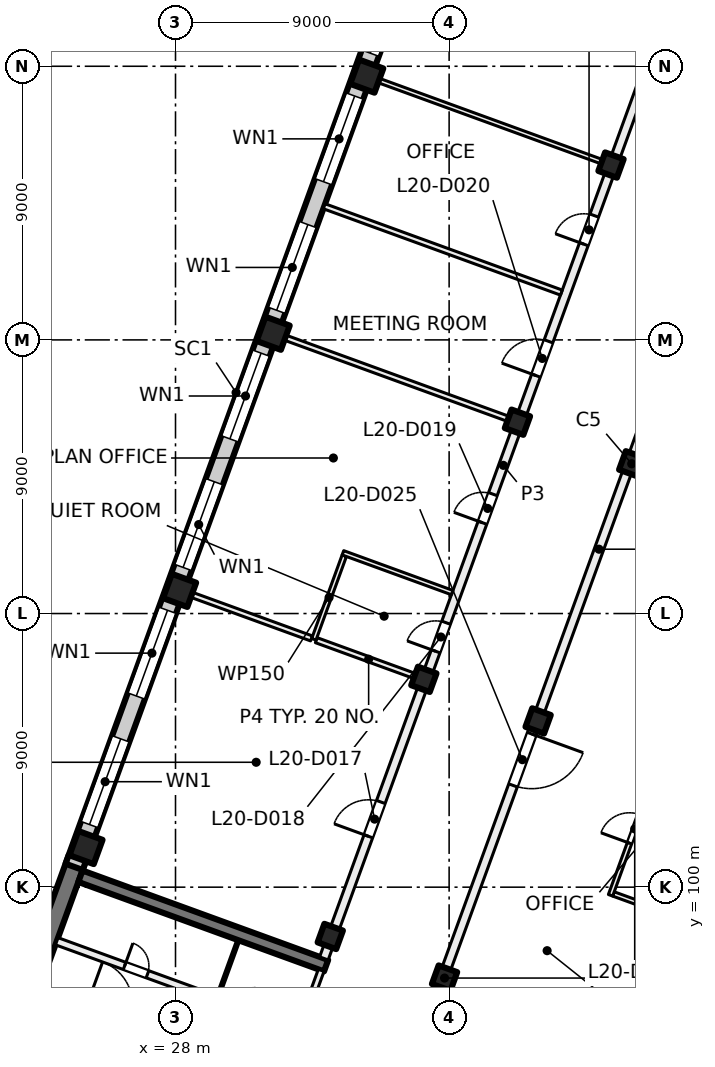
"""IFC4 building model, lengths in metres.
Left out: names, types, materials, properties, quantities, classifications, styles, units other than length and angle.
Written with IfcOpenShell. Run it as: python <this file> out.ifc"""

import sys

from ifc_helpers import new_model, si_unit, direction, frame, frame_2d, origin, origin_2d, place, context, subcontext, project, spatial, rectangle, extrude, element, fill, save


model = new_model("IFC4")
c1 = context("Model", 3, precision=1e-05, world=origin(), true_north=direction((0.0, 1.0)))
c2 = subcontext(c1, "Body", "Model", "MODEL_VIEW")
j1 = project(units=[si_unit("LENGTHUNIT", "METRE"), si_unit("PLANEANGLEUNIT", "RADIAN")], contexts=[c1])
p1 = place(None, origin())
s1 = spatial("IfcSite", under=j1, at=p1, CompositionType="ELEMENT")
p2 = place(p1, origin())
s2 = spatial("IfcBuilding", under=s1, at=p2, CompositionType="ELEMENT")
p3 = place(p2, frame((0.0, 0.0, 89.0)))
s3 = spatial("IfcBuildingStorey", under=s2, at=p3, CompositionType="ELEMENT", Elevation=89.0)
for number, where, z_axis, x_axis in (
    (1, (43.006, 113.925, 0.0), (0.0, 0.0, 1.0), (-0.342, -0.94, 0.0)),
    (2, (39.927, 105.468, 0.0), (0.0, 0.0, 1.0), (-0.342, -0.94, 0.0)),
    (3, (36.849, 97.011, 0.0), (0.0, 0.0, 1.0), (-0.342, -0.94, 0.0)),
    (4, (42.325, 123.751, 0.0), (0.0, 0.0, 1.0), (-0.342, -0.94, 0.0)),
    (5, (39.247, 115.293, 0.0), (0.0, 0.0, 1.0), (-0.342, -0.94, 0.0)),
    (6, (36.169, 106.836, 0.0), (0.0, 0.0, 1.0), (-0.342, -0.94, 0.0)),
    (7, (33.091, 98.379, 0.0), (0.0, 0.0, 1.0), (-0.342, -0.94, 0.0)),
):
    element("IfcColumn", number, at=place(p3, frame(where, z_axis=z_axis, x_axis=x_axis)), inside=s3, PredefinedType="COLUMN", context=c2, shape_type="SweptSolid", body=[
        extrude(rectangle(XDim=0.65, YDim=0.65, at=origin_2d()), origin(), (0.0, 0.0, 1.0), 4.0),
    ])
for number, where, z_axis, x_axis in (
    (8, (34.291, 126.675, 0.0), (0.0, 0.0, 1.0), (-0.342, -0.94, 0.0)),
    (9, (31.212, 118.218, 0.0), (0.0, 0.0, 1.0), (-0.342, -0.94, 0.0)),
    (10, (28.134, 109.76, 0.0), (0.0, 0.0, 1.0), (-0.342, -0.94, 0.0)),
    (11, (25.056, 101.303, 0.0), (0.0, 0.0, 1.0), (-0.342, -0.94, 0.0)),
):
    element("IfcColumn", number, at=place(p3, frame(where, z_axis=z_axis, x_axis=x_axis)), inside=s3, PredefinedType="COLUMN", context=c2, shape_type="SweptSolid", body=[
        extrude(rectangle(XDim=0.85, YDim=0.85, at=origin_2d()), origin(), (0.0, 0.0, 1.0), 4.0),
    ])
p4 = place(p3, frame((21.717, 92.568, 0.0), z_axis=(0.0, 0.0, 1.0), x_axis=(0.342017595281, 0.939693548195, 0.0)))
e12 = element("IfcWall", 12, at=p4, inside=s3, PredefinedType="SHEAR", context=c2, shape_type="SweptSolid", body=[
    extrude(rectangle(XDim=8.925, YDim=0.6, at=frame_2d((4.462, 0.0))), origin(), (0.0, 0.0, 1.0), 4.0),
])
p5 = place(p3, frame((32.953, 97.418, 0.0), z_axis=(0.0, 0.0, 1.0), x_axis=(-0.93969060187, 0.342025690201, 0.0)))
e13 = element("IfcWall", 13, at=p5, inside=s3, PredefinedType="SHEAR", context=c2, shape_type="SweptSolid", body=[
    extrude(rectangle(XDim=8.6, YDim=0.4, at=frame_2d((4.3, 0.0))), origin(), (0.0, 0.0, 1.0), 4.0),
])
p6 = place(p3, frame((24.666, 100.669, 0.0), z_axis=(0.0, 0.0, 1.0), x_axis=(0.34201964167, 0.939692803373, 0.0)))
e14 = element("IfcWall", 14, at=p6, inside=s3, PredefinedType="SOLIDWALL", context=c2, shape_type="SweptSolid", body=[
    extrude(rectangle(XDim=32.884, YDim=0.6, at=frame_2d((16.442, 0.0))), origin(), (0.0, 0.0, 1.0), 3.625),
])
p7 = place(p6, frame((1.48, 0.0, 0.9)))
e15 = element("IfcOpeningElement", 15, at=p7, cuts=e14, PredefinedType="OPENING", context=c2, shape_type="SweptSolid", body=[
    extrude(rectangle(XDim=3.0, YDim=2.4, at=frame_2d((1.5, 1.2))), frame((0.0, 0.31, 0.0), z_axis=(0.0, -1.0, 0.0), x_axis=(1.0, 0.0, 0.0)), (0.0, 0.0, 1.0), 0.62),
])
p8 = place(p6, frame((5.98, 0.0, 0.9)))
e16 = element("IfcOpeningElement", 16, at=p8, cuts=e14, PredefinedType="OPENING", context=c2, shape_type="SweptSolid", body=[
    extrude(rectangle(XDim=3.0, YDim=2.4, at=frame_2d((1.5, 1.2))), frame((0.0, 0.31, 0.0), z_axis=(0.0, -1.0, 0.0), x_axis=(1.0, 0.0, 0.0)), (0.0, 0.0, 1.0), 0.62),
])
p9 = place(p6, frame((10.48, 0.0, 0.9)))
e17 = element("IfcOpeningElement", 17, at=p9, cuts=e14, PredefinedType="OPENING", context=c2, shape_type="SweptSolid", body=[
    extrude(rectangle(XDim=3.0, YDim=2.4, at=frame_2d((1.5, 1.2))), frame((0.0, 0.31, 0.0), z_axis=(0.0, -1.0, 0.0), x_axis=(1.0, 0.0, 0.0)), (0.0, 0.0, 1.0), 0.62),
])
p10 = place(p6, frame((14.98, 0.0, 0.9)))
e18 = element("IfcOpeningElement", 18, at=p10, cuts=e14, PredefinedType="OPENING", context=c2, shape_type="SweptSolid", body=[
    extrude(rectangle(XDim=3.0, YDim=2.4, at=frame_2d((1.5, 1.2))), frame((0.0, 0.31, 0.0), z_axis=(0.0, -1.0, 0.0), x_axis=(1.0, 0.0, 0.0)), (0.0, 0.0, 1.0), 0.62),
])
p11 = place(p6, frame((19.48, 0.0, 0.9)))
e19 = element("IfcOpeningElement", 19, at=p11, cuts=e14, PredefinedType="OPENING", context=c2, shape_type="SweptSolid", body=[
    extrude(rectangle(XDim=3.0, YDim=2.4, at=frame_2d((1.5, 1.2))), frame((0.0, 0.31, 0.0), z_axis=(0.0, -1.0, 0.0), x_axis=(1.0, 0.0, 0.0)), (0.0, 0.0, 1.0), 0.62),
])
p12 = place(p6, frame((23.98, 0.0, 0.9)))
e20 = element("IfcOpeningElement", 20, at=p12, cuts=e14, PredefinedType="OPENING", context=c2, shape_type="SweptSolid", body=[
    extrude(rectangle(XDim=3.0, YDim=2.4, at=frame_2d((1.5, 1.2))), frame((0.0, 0.31, 0.0), z_axis=(0.0, -1.0, 0.0), x_axis=(1.0, 0.0, 0.0)), (0.0, 0.0, 1.0), 0.62),
])
p13 = place(p6, frame((28.48, 0.0, 0.9)))
e21 = element("IfcOpeningElement", 21, at=p13, cuts=e14, PredefinedType="OPENING", context=c2, shape_type="SweptSolid", body=[
    extrude(rectangle(XDim=3.0, YDim=2.4, at=frame_2d((1.5, 1.2))), frame((0.0, 0.31, 0.0), z_axis=(0.0, -1.0, 0.0), x_axis=(1.0, 0.0, 0.0)), (0.0, 0.0, 1.0), 0.62),
])
p14 = place(p3, frame((31.491, 93.693, 0.0), z_axis=(0.0, 0.0, 1.0), x_axis=(0.341995824804, 0.939701471648, 0.0)))
e22 = element("IfcWall", 22, at=p14, inside=s3, PredefinedType="PARTITIONING", context=c2, shape_type="SweptSolid", body=[
    extrude(rectangle(XDim=3.8, YDim=0.2, at=frame_2d((1.9, 0.0))), origin(), (0.0, 0.0, 1.0), 3.625),
])
p15 = place(p14, frame((0.3, 0.0, 0.0)))
e23 = element("IfcOpeningElement", 23, at=p15, cuts=e22, PredefinedType="OPENING", context=c2, shape_type="SweptSolid", body=[
    extrude(rectangle(XDim=1.2, YDim=2.1, at=frame_2d((0.6, 1.05))), frame((0.0, 0.11, 0.0), z_axis=(0.0, -1.0, 0.0), x_axis=(1.0, 0.0, 0.0)), (0.0, 0.0, 1.0), 0.22),
])
p16 = place(p3, frame((23.538, 96.694, 0.0), z_axis=(0.0, 0.0, 1.0), x_axis=(0.939691552312, -0.342023078919, 0.0)))
e24 = element("IfcWall", 24, at=p16, inside=s3, PredefinedType="PARTITIONING", context=c2, shape_type="SweptSolid", body=[
    extrude(rectangle(XDim=8.4, YDim=0.2, at=frame_2d((4.2, 0.0))), origin(), (0.0, 0.0, 1.0), 3.625),
])
p17 = place(p16, frame((1.65, 0.0, 0.0)))
e25 = element("IfcOpeningElement", 25, at=p17, cuts=e24, PredefinedType="OPENING", context=c2, shape_type="SweptSolid", body=[
    extrude(rectangle(XDim=1.5, YDim=2.1, at=frame_2d((0.75, 1.05))), frame((0.0, 0.11, 0.0), z_axis=(0.0, -1.0, 0.0), x_axis=(1.0, 0.0, 0.0)), (0.0, 0.0, 1.0), 0.22),
])
p18 = place(p3, frame((24.094, 98.221, 0.0), z_axis=(0.0, 0.0, 1.0), x_axis=(0.939691552312, -0.342023078919, 0.0)))
e26 = element("IfcWall", 26, at=p18, inside=s3, PredefinedType="PARTITIONING", context=c2, shape_type="SweptSolid", body=[
    extrude(rectangle(XDim=8.4, YDim=0.25, at=frame_2d((4.2, 0.0))), origin(), (0.0, 0.0, 1.0), 3.625),
])
p19 = place(p18, frame((6.625, 0.0, 0.0)))
e27 = element("IfcOpeningElement", 27, at=p19, cuts=e26, PredefinedType="OPENING", context=c2, shape_type="SweptSolid", body=[
    extrude(rectangle(XDim=0.8, YDim=2.1, at=frame_2d((0.4, 1.05))), frame((0.0, 0.135, 0.0), z_axis=(0.0, -1.0, 0.0), x_axis=(1.0, 0.0, 0.0)), (0.0, 0.0, 1.0), 0.27),
])
p20 = place(p18, frame((2.375, 0.0, 0.0)))
e28 = element("IfcOpeningElement", 28, at=p20, cuts=e26, PredefinedType="OPENING", context=c2, shape_type="SweptSolid", body=[
    extrude(rectangle(XDim=0.8, YDim=2.1, at=frame_2d((0.4, 1.05))), frame((0.0, 0.135, 0.0), z_axis=(0.0, -1.0, 0.0), x_axis=(1.0, 0.0, 0.0)), (0.0, 0.0, 1.0), 0.27),
])
p21 = place(p3, frame((29.399, 96.424, 0.0), z_axis=(0.0, 0.0, 1.0), x_axis=(0.341913947243, 0.939731266204, 0.0)))
e29 = element("IfcWall", 29, at=p21, inside=s3, PredefinedType="PARTITIONING", context=c2, shape_type="SweptSolid", body=[
    extrude(rectangle(XDim=1.95, YDim=0.1, at=frame_2d((0.975, 0.0))), origin(), (0.0, 0.0, 1.0), 3.625),
])
p22 = place(p3, frame((28.275, 109.709, 0.0), z_axis=(0.0, 0.0, 1.0), x_axis=(0.939727969122, -0.34192300895, 0.0)))
e30 = element("IfcWall", 30, at=p22, inside=s3, PredefinedType="PARTITIONING", context=c2, shape_type="SweptSolid", body=[
    extrude(rectangle(XDim=4.466, YDim=0.175, at=frame_2d((2.233, 0.0))), origin(), (0.0, 0.0, 1.0), 3.625),
])
p23 = place(p3, frame((31.353, 118.166, 0.0), z_axis=(0.0, 0.0, 1.0), x_axis=(0.939687752599, -0.342033518263, 0.0)))
e31 = element("IfcWall", 31, at=p23, inside=s3, PredefinedType="PARTITIONING", context=c2, shape_type="SweptSolid", body=[
    extrude(rectangle(XDim=8.301, YDim=0.175, at=frame_2d((4.15, 0.0))), origin(), (0.0, 0.0, 1.0), 3.625),
])
p24 = place(p3, frame((32.63, 108.124, 0.0), z_axis=(0.0, 0.0, 1.0), x_axis=(0.939692277825, -0.342021085601, 0.0)))
e32 = element("IfcWall", 32, at=p24, inside=s3, PredefinedType="PARTITIONING", context=c2, shape_type="SweptSolid", body=[
    extrude(rectangle(XDim=3.666, YDim=0.175, at=frame_2d((1.833, 0.0))), origin(), (0.0, 0.0, 1.0), 3.625),
])
p25 = place(p3, frame((32.551, 108.153, 0.0), z_axis=(0.0, 0.0, 1.0), x_axis=(0.341850278959, 0.939754428974, 0.0)))
e33 = element("IfcWall", 33, at=p25, inside=s3, PredefinedType="PARTITIONING", context=c2, shape_type="SweptSolid", body=[
    extrude(rectangle(XDim=2.925, YDim=0.15, at=frame_2d((1.463, 0.0))), origin(), (0.0, 0.0, 1.0), 3.625),
])
p26 = place(p3, frame((32.881, 97.657, 0.0), z_axis=(0.0, 0.0, 1.0), x_axis=(0.342017360004, 0.939693633828, 0.0)))
e34 = element("IfcWall", 34, at=p26, inside=s3, PredefinedType="PARTITIONING", context=c2, shape_type="SweptSolid", body=[
    extrude(rectangle(XDim=34.516, YDim=0.3, at=frame_2d((17.258, 0.0))), origin(), (0.0, 0.0, 1.0), 3.625),
])
p27 = place(p26, frame((4.275, 0.0, 0.0)))
e35 = element("IfcOpeningElement", 35, at=p27, cuts=e34, PredefinedType="OPENING", context=c2, shape_type="SweptSolid", body=[
    extrude(rectangle(XDim=1.2, YDim=2.1, at=frame_2d((0.6, 1.05))), frame((0.0, 0.16, 0.0), z_axis=(0.0, -1.0, 0.0), x_axis=(1.0, 0.0, 0.0)), (0.0, 0.0, 1.0), 0.32),
])
p28 = place(p26, frame((10.75, 0.0, 0.0)))
e36 = element("IfcOpeningElement", 36, at=p28, cuts=e34, PredefinedType="OPENING", context=c2, shape_type="SweptSolid", body=[
    extrude(rectangle(XDim=1.0, YDim=2.1, at=frame_2d((0.5, 1.05))), frame((0.0, 0.16, 0.0), z_axis=(0.0, -1.0, 0.0), x_axis=(1.0, 0.0, 0.0)), (0.0, 0.0, 1.0), 0.32),
])
p29 = place(p26, frame((15.25, 0.0, 0.0)))
e37 = element("IfcOpeningElement", 37, at=p29, cuts=e34, PredefinedType="OPENING", context=c2, shape_type="SweptSolid", body=[
    extrude(rectangle(XDim=1.0, YDim=2.1, at=frame_2d((0.5, 1.05))), frame((0.0, 0.16, 0.0), z_axis=(0.0, -1.0, 0.0), x_axis=(1.0, 0.0, 0.0)), (0.0, 0.0, 1.0), 0.32),
])
p30 = place(p26, frame((20.4, 0.0, 0.0)))
e38 = element("IfcOpeningElement", 38, at=p30, cuts=e34, PredefinedType="OPENING", context=c2, shape_type="SweptSolid", body=[
    extrude(rectangle(XDim=1.2, YDim=2.1, at=frame_2d((0.6, 1.05))), frame((0.0, 0.16, 0.0), z_axis=(0.0, -1.0, 0.0), x_axis=(1.0, 0.0, 0.0)), (0.0, 0.0, 1.0), 0.32),
])
p31 = place(p26, frame((25.0, 0.0, 0.0)))
e39 = element("IfcOpeningElement", 39, at=p31, cuts=e34, PredefinedType="OPENING", context=c2, shape_type="SweptSolid", body=[
    extrude(rectangle(XDim=1.0, YDim=2.1, at=frame_2d((0.5, 1.05))), frame((0.0, 0.16, 0.0), z_axis=(0.0, -1.0, 0.0), x_axis=(1.0, 0.0, 0.0)), (0.0, 0.0, 1.0), 0.32),
])
p32 = place(p3, frame((32.892, 122.395, 0.0), z_axis=(0.0, 0.0, 1.0), x_axis=(0.939684311623, -0.3420429717, 0.0)))
e40 = element("IfcWall", 40, at=p32, inside=s3, PredefinedType="PARTITIONING", context=c2, shape_type="SweptSolid", body=[
    extrude(rectangle(XDim=8.301, YDim=0.175, at=frame_2d((4.15, 0.0))), origin(), (0.0, 0.0, 1.0), 3.625),
])
p33 = place(p3, frame((33.507, 110.998, 0.0), z_axis=(0.0, 0.0, 1.0), x_axis=(0.939610657605, -0.342245251415, 0.0)))
e41 = element("IfcWall", 41, at=p33, inside=s3, PredefinedType="PARTITIONING", context=c2, shape_type="SweptSolid", body=[
    extrude(rectangle(XDim=3.825, YDim=0.15, at=frame_2d((1.913, 0.0))), origin(), (0.0, 0.0, 1.0), 3.625),
])
p34 = place(p3, frame((46.282, 98.367, 0.0), z_axis=(0.0, 0.0, 1.0), x_axis=(-0.939765774653, 0.341819087808, 0.0)))
e42 = element("IfcWall", 42, at=p34, inside=s3, PredefinedType="PARTITIONING", context=c2, shape_type="SweptSolid", body=[
    extrude(rectangle(XDim=4.125, YDim=0.15, at=frame_2d((2.063, 0.0))), origin(), (0.0, 0.0, 1.0), 3.625),
])
p35 = place(p3, frame((42.309, 99.733, 0.0), z_axis=(0.0, 0.0, 1.0), x_axis=(0.342023551531, 0.939691380293, 0.0)))
e43 = element("IfcWall", 43, at=p35, inside=s3, PredefinedType="PARTITIONING", context=c2, shape_type="SweptSolid", body=[
    extrude(rectangle(XDim=13.488, YDim=0.15, at=frame_2d((6.744, 0.0))), origin(), (0.0, 0.0, 1.0), 3.625),
])
p36 = place(p35, frame((1.825, 0.0, 0.0)))
e44 = element("IfcOpeningElement", 44, at=p36, cuts=e43, PredefinedType="OPENING", context=c2, shape_type="SweptSolid", body=[
    extrude(rectangle(XDim=1.0, YDim=2.1, at=frame_2d((0.5, 1.05))), frame((0.0, 0.085, 0.0), z_axis=(0.0, -1.0, 0.0), x_axis=(1.0, 0.0, 0.0)), (0.0, 0.0, 1.0), 0.17),
])
p37 = place(p35, frame((6.325, 0.0, 0.0)))
e45 = element("IfcOpeningElement", 45, at=p37, cuts=e43, PredefinedType="OPENING", context=c2, shape_type="SweptSolid", body=[
    extrude(rectangle(XDim=1.0, YDim=2.1, at=frame_2d((0.5, 1.05))), frame((0.0, 0.085, 0.0), z_axis=(0.0, -1.0, 0.0), x_axis=(1.0, 0.0, 0.0)), (0.0, 0.0, 1.0), 0.17),
])
p38 = place(p35, frame((10.791, 0.0, 0.0)))
e46 = element("IfcOpeningElement", 46, at=p38, cuts=e43, PredefinedType="OPENING", context=c2, shape_type="SweptSolid", body=[
    extrude(rectangle(XDim=1.0, YDim=2.1, at=frame_2d((0.5, 1.05))), frame((0.0, 0.085, 0.0), z_axis=(0.0, -1.0, 0.0), x_axis=(1.0, 0.0, 0.0)), (0.0, 0.0, 1.0), 0.17),
])
p39 = place(p3, frame((42.231, 123.785, 0.0), z_axis=(0.0, 0.0, 1.0), x_axis=(-0.939687752599, 0.342033518263, 0.0)))
e47 = element("IfcWall", 47, at=p39, inside=s3, PredefinedType="PARTITIONING", context=c2, shape_type="SweptSolid", body=[
    extrude(rectangle(XDim=8.301, YDim=0.15, at=frame_2d((4.15, 0.0))), origin(), (0.0, 0.0, 1.0), 3.625),
])
p40 = place(p3, frame((43.1, 113.891, 0.0), z_axis=(0.0, 0.0, 1.0), x_axis=(0.939670544866, -0.342080790328, 0.0)))
e48 = element("IfcWall", 48, at=p40, inside=s3, PredefinedType="PARTITIONING", context=c2, shape_type="SweptSolid", body=[
    extrude(rectangle(XDim=8.3, YDim=0.175, at=frame_2d((4.15, 0.0))), origin(), (0.0, 0.0, 1.0), 3.625),
])
p41 = place(p3, frame((47.314, 125.909, 0.0), z_axis=(0.0, 0.0, 1.0), x_axis=(-0.342010770371, -0.939696032209, 0.0)))
e49 = element("IfcWall", 49, at=p41, inside=s3, PredefinedType="PARTITIONING", context=c2, shape_type="SweptSolid", body=[
    extrude(rectangle(XDim=31.485, YDim=0.3, at=frame_2d((15.742, 0.0))), origin(), (0.0, 0.0, 1.0), 3.625),
])
p42 = place(p41, frame((22.21, 0.0, 0.0)))
e50 = element("IfcOpeningElement", 50, at=p42, cuts=e49, PredefinedType="OPENING", context=c2, shape_type="SweptSolid", body=[
    extrude(rectangle(XDim=1.8, YDim=2.1, at=frame_2d((0.9, 1.05))), frame((0.0, 0.16, 0.0), z_axis=(0.0, -1.0, 0.0), x_axis=(1.0, 0.0, 0.0)), (0.0, 0.0, 1.0), 0.32),
])
p43 = place(p41, frame((9.885, 0.0, 0.0)))
e51 = element("IfcOpeningElement", 51, at=p43, cuts=e49, PredefinedType="OPENING", context=c2, shape_type="SweptSolid", body=[
    extrude(rectangle(XDim=1.2, YDim=2.1, at=frame_2d((0.6, 1.05))), frame((0.0, 0.16, 0.0), z_axis=(0.0, -1.0, 0.0), x_axis=(1.0, 0.0, 0.0)), (0.0, 0.0, 1.0), 0.32),
])
p44 = place(p41, frame((5.484, 0.0, 0.0)))
e52 = element("IfcOpeningElement", 52, at=p44, cuts=e49, PredefinedType="OPENING", context=c2, shape_type="SweptSolid", body=[
    extrude(rectangle(XDim=1.0, YDim=2.1, at=frame_2d((0.5, 1.05))), frame((0.0, 0.16, 0.0), z_axis=(0.0, -1.0, 0.0), x_axis=(1.0, 0.0, 0.0)), (0.0, 0.0, 1.0), 0.32),
])
p45 = place(p7, origin())
e53 = element("IfcWindow", 53, at=p45, inside=s3, PartitioningType="SINGLE_PANEL", PredefinedType="WINDOW", context=c2, shape_type="SweptSolid", body=[
    extrude(rectangle(XDim=3.0, YDim=2.4, at=frame_2d((1.5, 1.2))), frame((0.0, 0.03, 0.0), z_axis=(0.0, -1.0, 0.0), x_axis=(1.0, 0.0, 0.0)), (0.0, 0.0, 1.0), 0.06),
])
fill(e15, e53)
p46 = place(p8, origin())
e54 = element("IfcWindow", 54, at=p46, inside=s3, PartitioningType="SINGLE_PANEL", PredefinedType="WINDOW", context=c2, shape_type="SweptSolid", body=[
    extrude(rectangle(XDim=3.0, YDim=2.4, at=frame_2d((1.5, 1.2))), frame((0.0, 0.03, 0.0), z_axis=(0.0, -1.0, 0.0), x_axis=(1.0, 0.0, 0.0)), (0.0, 0.0, 1.0), 0.06),
])
fill(e16, e54)
p47 = place(p9, origin())
e55 = element("IfcWindow", 55, at=p47, inside=s3, PartitioningType="SINGLE_PANEL", PredefinedType="WINDOW", context=c2, shape_type="SweptSolid", body=[
    extrude(rectangle(XDim=3.0, YDim=2.4, at=frame_2d((1.5, 1.2))), frame((0.0, 0.03, 0.0), z_axis=(0.0, -1.0, 0.0), x_axis=(1.0, 0.0, 0.0)), (0.0, 0.0, 1.0), 0.06),
])
fill(e17, e55)
p48 = place(p10, origin())
e56 = element("IfcWindow", 56, at=p48, inside=s3, PartitioningType="SINGLE_PANEL", PredefinedType="WINDOW", context=c2, shape_type="SweptSolid", body=[
    extrude(rectangle(XDim=3.0, YDim=2.4, at=frame_2d((1.5, 1.2))), frame((0.0, 0.03, 0.0), z_axis=(0.0, -1.0, 0.0), x_axis=(1.0, 0.0, 0.0)), (0.0, 0.0, 1.0), 0.06),
])
fill(e18, e56)
p49 = place(p11, origin())
e57 = element("IfcWindow", 57, at=p49, inside=s3, PartitioningType="SINGLE_PANEL", PredefinedType="WINDOW", context=c2, shape_type="SweptSolid", body=[
    extrude(rectangle(XDim=3.0, YDim=2.4, at=frame_2d((1.5, 1.2))), frame((0.0, 0.03, 0.0), z_axis=(0.0, -1.0, 0.0), x_axis=(1.0, 0.0, 0.0)), (0.0, 0.0, 1.0), 0.06),
])
fill(e19, e57)
p50 = place(p12, origin())
e58 = element("IfcWindow", 58, at=p50, inside=s3, PartitioningType="SINGLE_PANEL", PredefinedType="WINDOW", context=c2, shape_type="SweptSolid", body=[
    extrude(rectangle(XDim=3.0, YDim=2.4, at=frame_2d((1.5, 1.2))), frame((0.0, 0.03, 0.0), z_axis=(0.0, -1.0, 0.0), x_axis=(1.0, 0.0, 0.0)), (0.0, 0.0, 1.0), 0.06),
])
fill(e20, e58)
p51 = place(p13, origin())
e59 = element("IfcWindow", 59, at=p51, inside=s3, PartitioningType="SINGLE_PANEL", PredefinedType="WINDOW", context=c2, shape_type="SweptSolid", body=[
    extrude(rectangle(XDim=3.0, YDim=2.4, at=frame_2d((1.5, 1.2))), frame((0.0, 0.03, 0.0), z_axis=(0.0, -1.0, 0.0), x_axis=(1.0, 0.0, 0.0)), (0.0, 0.0, 1.0), 0.06),
])
fill(e21, e59)
p52 = place(p20, origin())
e60 = element("IfcDoor", 60, at=p52, inside=s3, OperationType="SINGLE_SWING_RIGHT", PredefinedType="DOOR", context=c2, shape_type="SweptSolid", body=[
    extrude(rectangle(XDim=0.8, YDim=2.1, at=frame_2d((0.4, 1.05))), frame((0.0, 0.025, 0.0), z_axis=(0.0, -1.0, 0.0), x_axis=(1.0, 0.0, 0.0)), (0.0, 0.0, 1.0), 0.05),
])
fill(e28, e60)
p53 = place(p27, origin())
e61 = element("IfcDoor", 61, at=p53, inside=s3, OperationType="DOUBLE_DOOR_SINGLE_SWING", PredefinedType="DOOR", context=c2, shape_type="SweptSolid", body=[
    extrude(rectangle(XDim=1.2, YDim=2.1, at=frame_2d((0.6, 1.05))), frame((0.0, 0.025, 0.0), z_axis=(0.0, -1.0, 0.0), x_axis=(1.0, 0.0, 0.0)), (0.0, 0.0, 1.0), 0.05),
])
fill(e35, e61)
p54 = place(p28, origin())
e62 = element("IfcDoor", 62, at=p54, inside=s3, OperationType="SINGLE_SWING_RIGHT", PredefinedType="DOOR", context=c2, shape_type="SweptSolid", body=[
    extrude(rectangle(XDim=1.0, YDim=2.1, at=frame_2d((0.5, 1.05))), frame((0.0, 0.025, 0.0), z_axis=(0.0, -1.0, 0.0), x_axis=(1.0, 0.0, 0.0)), (0.0, 0.0, 1.0), 0.05),
])
fill(e36, e62)
p55 = place(p29, origin())
e63 = element("IfcDoor", 63, at=p55, inside=s3, OperationType="SINGLE_SWING_LEFT", PredefinedType="DOOR", context=c2, shape_type="SweptSolid", body=[
    extrude(rectangle(XDim=1.0, YDim=2.1, at=frame_2d((0.5, 1.05))), frame((0.0, 0.025, 0.0), z_axis=(0.0, -1.0, 0.0), x_axis=(1.0, 0.0, 0.0)), (0.0, 0.0, 1.0), 0.05),
])
fill(e37, e63)
p56 = place(p30, origin())
e64 = element("IfcDoor", 64, at=p56, inside=s3, OperationType="DOUBLE_DOOR_SINGLE_SWING", PredefinedType="DOOR", context=c2, shape_type="SweptSolid", body=[
    extrude(rectangle(XDim=1.2, YDim=2.1, at=frame_2d((0.6, 1.05))), frame((0.0, 0.025, 0.0), z_axis=(0.0, -1.0, 0.0), x_axis=(1.0, 0.0, 0.0)), (0.0, 0.0, 1.0), 0.05),
])
fill(e38, e64)
p57 = place(p31, origin())
e65 = element("IfcDoor", 65, at=p57, inside=s3, OperationType="SINGLE_SWING_RIGHT", PredefinedType="DOOR", context=c2, shape_type="SweptSolid", body=[
    extrude(rectangle(XDim=1.0, YDim=2.1, at=frame_2d((0.5, 1.05))), frame((0.0, 0.025, 0.0), z_axis=(0.0, -1.0, 0.0), x_axis=(1.0, 0.0, 0.0)), (0.0, 0.0, 1.0), 0.05),
])
fill(e39, e65)
p58 = place(p36, origin())
e66 = element("IfcDoor", 66, at=p58, inside=s3, OperationType="SINGLE_SWING_LEFT", PredefinedType="DOOR", context=c2, shape_type="SweptSolid", body=[
    extrude(rectangle(XDim=1.0, YDim=2.1, at=frame_2d((0.5, 1.05))), frame((0.0, 0.025, 0.0), z_axis=(0.0, -1.0, 0.0), x_axis=(1.0, 0.0, 0.0)), (0.0, 0.0, 1.0), 0.05),
])
fill(e44, e66)
p59 = place(p42, origin())
e67 = element("IfcDoor", 67, at=p59, inside=s3, OperationType="DOUBLE_DOOR_SINGLE_SWING", PredefinedType="DOOR", context=c2, shape_type="SweptSolid", body=[
    extrude(rectangle(XDim=1.8, YDim=2.1, at=frame_2d((0.9, 1.05))), frame((0.0, 0.025, 0.0), z_axis=(0.0, -1.0, 0.0), x_axis=(1.0, 0.0, 0.0)), (0.0, 0.0, 1.0), 0.05),
])
fill(e50, e67)
save(model, sys.argv[1])
